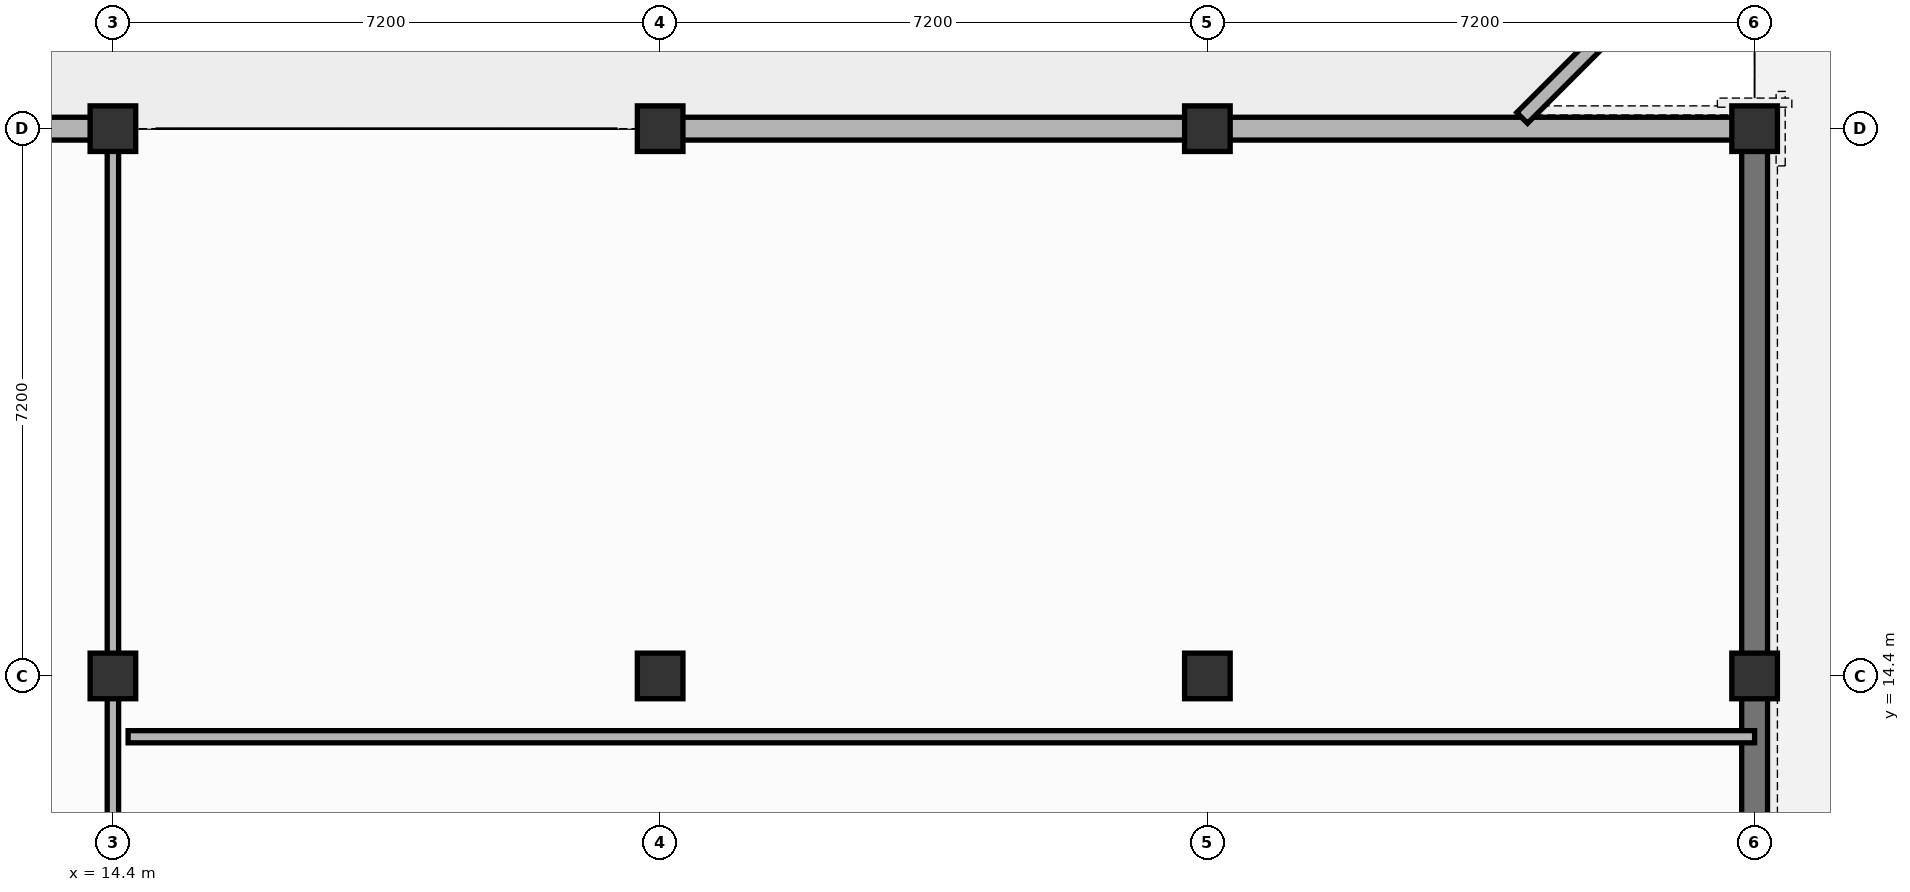
"""IFC4 building model, lengths in metres.
Left out: names, types, materials, properties, quantities, classifications, styles, units other than length and angle.
Written with IfcOpenShell. Run it as: python <this file> out.ifc"""

import sys

from ifc_helpers import new_model, si_unit, direction, frame, frame_2d, origin, origin_2d, place, context, subcontext, project, spatial, rectangle, extrude, element, fill, save


model = new_model("IFC4")
c1 = context("Model", 3, precision=1e-05, world=origin(), true_north=direction((0.0, 1.0)))
c2 = subcontext(c1, "Body", "Model", "MODEL_VIEW")
j1 = project(units=[si_unit("LENGTHUNIT", "METRE"), si_unit("PLANEANGLEUNIT", "RADIAN")], contexts=[c1])
p1 = place(None, origin())
s1 = spatial("IfcSite", under=j1, at=p1, CompositionType="ELEMENT")
p2 = place(p1, origin())
s2 = spatial("IfcBuilding", under=s1, at=p2, CompositionType="ELEMENT")
p3 = place(p2, frame((0.0, 0.0, 8.94)))
s3 = spatial("IfcBuildingStorey", under=s2, at=p3, CompositionType="ELEMENT", Elevation=8.94)
for number, where, z_axis, x_axis in (
    (1, (14.4, 14.4, 0.0), (0.0, 0.0, 1.0), (1.0, 0.0, 0.0)),
    (2, (14.4, 21.6, 0.0), (0.0, 0.0, 1.0), (1.0, 0.0, 0.0)),
    (3, (21.6, 14.4, 0.0), (0.0, 0.0, 1.0), (1.0, 0.0, 0.0)),
    (4, (21.6, 21.6, 0.0), (0.0, 0.0, 1.0), (1.0, 0.0, 0.0)),
    (5, (28.8, 14.4, 0.0), (0.0, 0.0, 1.0), (1.0, 0.0, 0.0)),
    (6, (28.8, 21.6, 0.0), (0.0, 0.0, 1.0), (1.0, 0.0, 0.0)),
    (7, (36.0, 14.4, 0.0), (0.0, 0.0, 1.0), (1.0, 0.0, 0.0)),
    (8, (36.0, 21.6, 0.0), (0.0, 0.0, 1.0), (1.0, 0.0, 0.0)),
):
    element("IfcColumn", number, at=place(p3, frame(where, z_axis=z_axis, x_axis=x_axis)), inside=s3, PredefinedType="COLUMN", context=c2, shape_type="SweptSolid", body=[
        extrude(rectangle(XDim=0.6, YDim=0.6, at=origin_2d()), origin(), (0.0, 0.0, 1.0), 3.84),
    ])
p4 = place(p3, frame((36.0, 0.0, 0.0), z_axis=(0.0, 0.0, 1.0), x_axis=(0.0, 1.0, 0.0)))
e9 = element("IfcWall", 9, at=p4, inside=s3, PredefinedType="SOLIDWALL", context=c2, shape_type="SweptSolid", body=[
    extrude(rectangle(XDim=21.6, YDim=0.34, at=frame_2d((10.8, 0.0))), origin(), (0.0, 0.0, 1.0), 3.53),
])
p5 = place(p4, frame((10.2, 0.0, 0.0)))
e10 = element("IfcOpeningElement", 10, at=p5, cuts=e9, PredefinedType="OPENING", context=c2, shape_type="SweptSolid", body=[
    extrude(rectangle(XDim=1.05, YDim=2.2, at=frame_2d((0.525, 1.1))), frame((0.0, 0.18, 0.0), z_axis=(0.0, -1.0, 0.0), x_axis=(1.0, 0.0, 0.0)), (0.0, 0.0, 1.0), 0.36),
])
p6 = place(p4, frame((2.8, 0.0, 0.9)))
e11 = element("IfcOpeningElement", 11, at=p6, cuts=e9, PredefinedType="OPENING", context=c2, shape_type="SweptSolid", body=[
    extrude(rectangle(XDim=2.3, YDim=1.7, at=frame_2d((1.15, 0.85))), frame((0.0, 0.18, 0.0), z_axis=(0.0, -1.0, 0.0), x_axis=(1.0, 0.0, 0.0)), (0.0, 0.0, 1.0), 0.36),
])
p7 = place(p4, frame((15.2, 0.0, 0.705)))
e12 = element("IfcOpeningElement", 12, at=p7, cuts=e9, PredefinedType="OPENING", context=c2, shape_type="SweptSolid", body=[
    extrude(rectangle(XDim=1.6, YDim=2.05, at=frame_2d((0.8, 1.025))), frame((0.0, 0.18, 0.0), z_axis=(0.0, -1.0, 0.0), x_axis=(1.0, 0.0, 0.0)), (0.0, 0.0, 1.0), 0.36),
])
p8 = place(p3, frame((7.2, 21.6, 0.0), z_axis=(0.0, 0.0, 1.0), x_axis=(1.0, 0.0, 0.0)))
e13 = element("IfcWall", 13, at=p8, inside=s3, PredefinedType="SOLIDWALL", context=c2, shape_type="SweptSolid", body=[
    extrude(rectangle(XDim=7.2, YDim=0.3, at=frame_2d((3.6, 0.0))), origin(), (0.0, 0.0, 1.0), 2.855),
])
p9 = place(p8, frame((2.0, 0.0, 0.685)))
e14 = element("IfcOpeningElement", 14, at=p9, cuts=e13, PredefinedType="OPENING", context=c2, shape_type="SweptSolid", body=[
    extrude(rectangle(XDim=1.6, YDim=2.05, at=frame_2d((0.8, 1.025))), frame((0.0, 0.16, 0.0), z_axis=(0.0, -1.0, 0.0), x_axis=(1.0, 0.0, 0.0)), (0.0, 0.0, 1.0), 0.32),
])
p10 = place(p3, frame((21.6, 21.6, 0.0), z_axis=(0.0, 0.0, 1.0), x_axis=(1.0, 0.0, 0.0)))
e15 = element("IfcWall", 15, at=p10, inside=s3, PredefinedType="SOLIDWALL", context=c2, shape_type="SweptSolid", body=[
    extrude(rectangle(XDim=7.2, YDim=0.3, at=frame_2d((3.6, 0.0))), origin(), (0.0, 0.0, 1.0), 2.855),
])
p11 = place(p10, frame((2.0, 0.0, 0.685)))
e16 = element("IfcOpeningElement", 16, at=p11, cuts=e15, PredefinedType="OPENING", context=c2, shape_type="SweptSolid", body=[
    extrude(rectangle(XDim=1.6, YDim=2.05, at=frame_2d((0.8, 1.025))), frame((0.0, 0.16, 0.0), z_axis=(0.0, -1.0, 0.0), x_axis=(1.0, 0.0, 0.0)), (0.0, 0.0, 1.0), 0.32),
])
p12 = place(p3, frame((28.8, 21.6, 0.0), z_axis=(0.0, 0.0, 1.0), x_axis=(1.0, 0.0, 0.0)))
e17 = element("IfcWall", 17, at=p12, inside=s3, PredefinedType="SOLIDWALL", context=c2, shape_type="SweptSolid", body=[
    extrude(rectangle(XDim=7.2, YDim=0.3, at=frame_2d((3.6, 0.0))), origin(), (0.0, 0.0, 1.0), 2.795),
])
p13 = place(p12, frame((2.0, 0.0, 0.625)))
e18 = element("IfcOpeningElement", 18, at=p13, cuts=e17, PredefinedType="OPENING", context=c2, shape_type="SweptSolid", body=[
    extrude(rectangle(XDim=1.6, YDim=2.05, at=frame_2d((0.8, 1.025))), frame((0.0, 0.16, 0.0), z_axis=(0.0, -1.0, 0.0), x_axis=(1.0, 0.0, 0.0)), (0.0, 0.0, 1.0), 0.32),
])
p14 = place(p3, frame((32.941, 21.741, 0.0), z_axis=(0.0, 0.0, 1.0), x_axis=(0.707106781187, 0.707106781187, 0.0)))
e19 = element("IfcWall", 19, at=p14, inside=s3, PredefinedType="PARAPET", context=c2, shape_type="SweptSolid", body=[
    extrude(rectangle(XDim=4.125, YDim=0.2, at=frame_2d((2.063, 0.0))), origin(), (0.0, 0.0, 1.0), 0.72),
])
p15 = place(p3, frame((14.4, 9.0, 0.0), z_axis=(0.0, 0.0, 1.0), x_axis=(0.0, 1.0, 0.0)))
e20 = element("IfcWall", 20, at=p15, inside=s3, PredefinedType="PARTITIONING", context=c2, shape_type="SweptSolid", body=[
    extrude(rectangle(XDim=12.6, YDim=0.15, at=frame_2d((6.3, 0.0))), origin(), (0.0, 0.0, 1.0), 2.755),
])
p16 = place(p15, frame((8.2, 0.0, 0.0)))
e21 = element("IfcOpeningElement", 21, at=p16, cuts=e20, PredefinedType="OPENING", context=c2, shape_type="SweptSolid", body=[
    extrude(rectangle(XDim=1.6, YDim=2.2, at=frame_2d((0.8, 1.1))), frame((0.0, 0.085, 0.0), z_axis=(0.0, -1.0, 0.0), x_axis=(1.0, 0.0, 0.0)), (0.0, 0.0, 1.0), 0.17),
])
p17 = place(p3, frame((14.6, 13.6, 0.0), z_axis=(0.0, 0.0, 1.0), x_axis=(1.0, 0.0, 0.0)))
e22 = element("IfcWall", 22, at=p17, inside=s3, PredefinedType="PARTITIONING", context=c2, shape_type="SweptSolid", body=[
    extrude(rectangle(XDim=21.4, YDim=0.16, at=frame_2d((10.7, 0.0))), origin(), (0.0, 0.0, 1.0), 3.53),
])
p18 = place(p17, frame((2.8, 0.0, 0.0)))
e23 = element("IfcOpeningElement", 23, at=p18, cuts=e22, PredefinedType="OPENING", context=c2, shape_type="SweptSolid", body=[
    extrude(rectangle(XDim=1.6, YDim=2.2, at=frame_2d((0.8, 1.1))), frame((0.0, 0.09, 0.0), z_axis=(0.0, -1.0, 0.0), x_axis=(1.0, 0.0, 0.0)), (0.0, 0.0, 1.0), 0.18),
])
p19 = place(p7, origin())
e24 = element("IfcWindow", 24, at=p19, inside=s3, PartitioningType="SINGLE_PANEL", PredefinedType="WINDOW", context=c2, shape_type="SweptSolid", body=[
    extrude(rectangle(XDim=1.6, YDim=2.05, at=frame_2d((0.8, 1.025))), frame((0.0, 0.03, 0.0), z_axis=(0.0, -1.0, 0.0), x_axis=(1.0, 0.0, 0.0)), (0.0, 0.0, 1.0), 0.06),
])
fill(e12, e24)
p20 = place(p11, origin())
e25 = element("IfcWindow", 25, at=p20, inside=s3, PartitioningType="SINGLE_PANEL", PredefinedType="WINDOW", context=c2, shape_type="SweptSolid", body=[
    extrude(rectangle(XDim=1.6, YDim=2.05, at=frame_2d((0.8, 1.025))), frame((0.0, 0.03, 0.0), z_axis=(0.0, -1.0, 0.0), x_axis=(1.0, 0.0, 0.0)), (0.0, 0.0, 1.0), 0.06),
])
fill(e16, e25)
p21 = place(p13, origin())
e26 = element("IfcWindow", 26, at=p21, inside=s3, PartitioningType="SINGLE_PANEL", PredefinedType="WINDOW", context=c2, shape_type="SweptSolid", body=[
    extrude(rectangle(XDim=1.6, YDim=2.05, at=frame_2d((0.8, 1.025))), frame((0.0, 0.03, 0.0), z_axis=(0.0, -1.0, 0.0), x_axis=(1.0, 0.0, 0.0)), (0.0, 0.0, 1.0), 0.06),
])
fill(e18, e26)
p22 = place(p16, origin())
e27 = element("IfcDoor", 27, at=p22, inside=s3, OperationType="DOUBLE_DOOR_SINGLE_SWING", PredefinedType="DOOR", context=c2, shape_type="SweptSolid", body=[
    extrude(rectangle(XDim=1.6, YDim=2.2, at=frame_2d((0.8, 1.1))), frame((0.0, 0.025, 0.0), z_axis=(0.0, -1.0, 0.0), x_axis=(1.0, 0.0, 0.0)), (0.0, 0.0, 1.0), 0.05),
])
fill(e21, e27)
p23 = place(p18, origin())
e28 = element("IfcDoor", 28, at=p23, inside=s3, OperationType="DOUBLE_DOOR_SINGLE_SWING", PredefinedType="DOOR", context=c2, shape_type="SweptSolid", body=[
    extrude(rectangle(XDim=1.6, YDim=2.2, at=frame_2d((0.8, 1.1))), frame((0.0, 0.025, 0.0), z_axis=(0.0, -1.0, 0.0), x_axis=(1.0, 0.0, 0.0)), (0.0, 0.0, 1.0), 0.05),
])
fill(e23, e28)
save(model, sys.argv[1])
